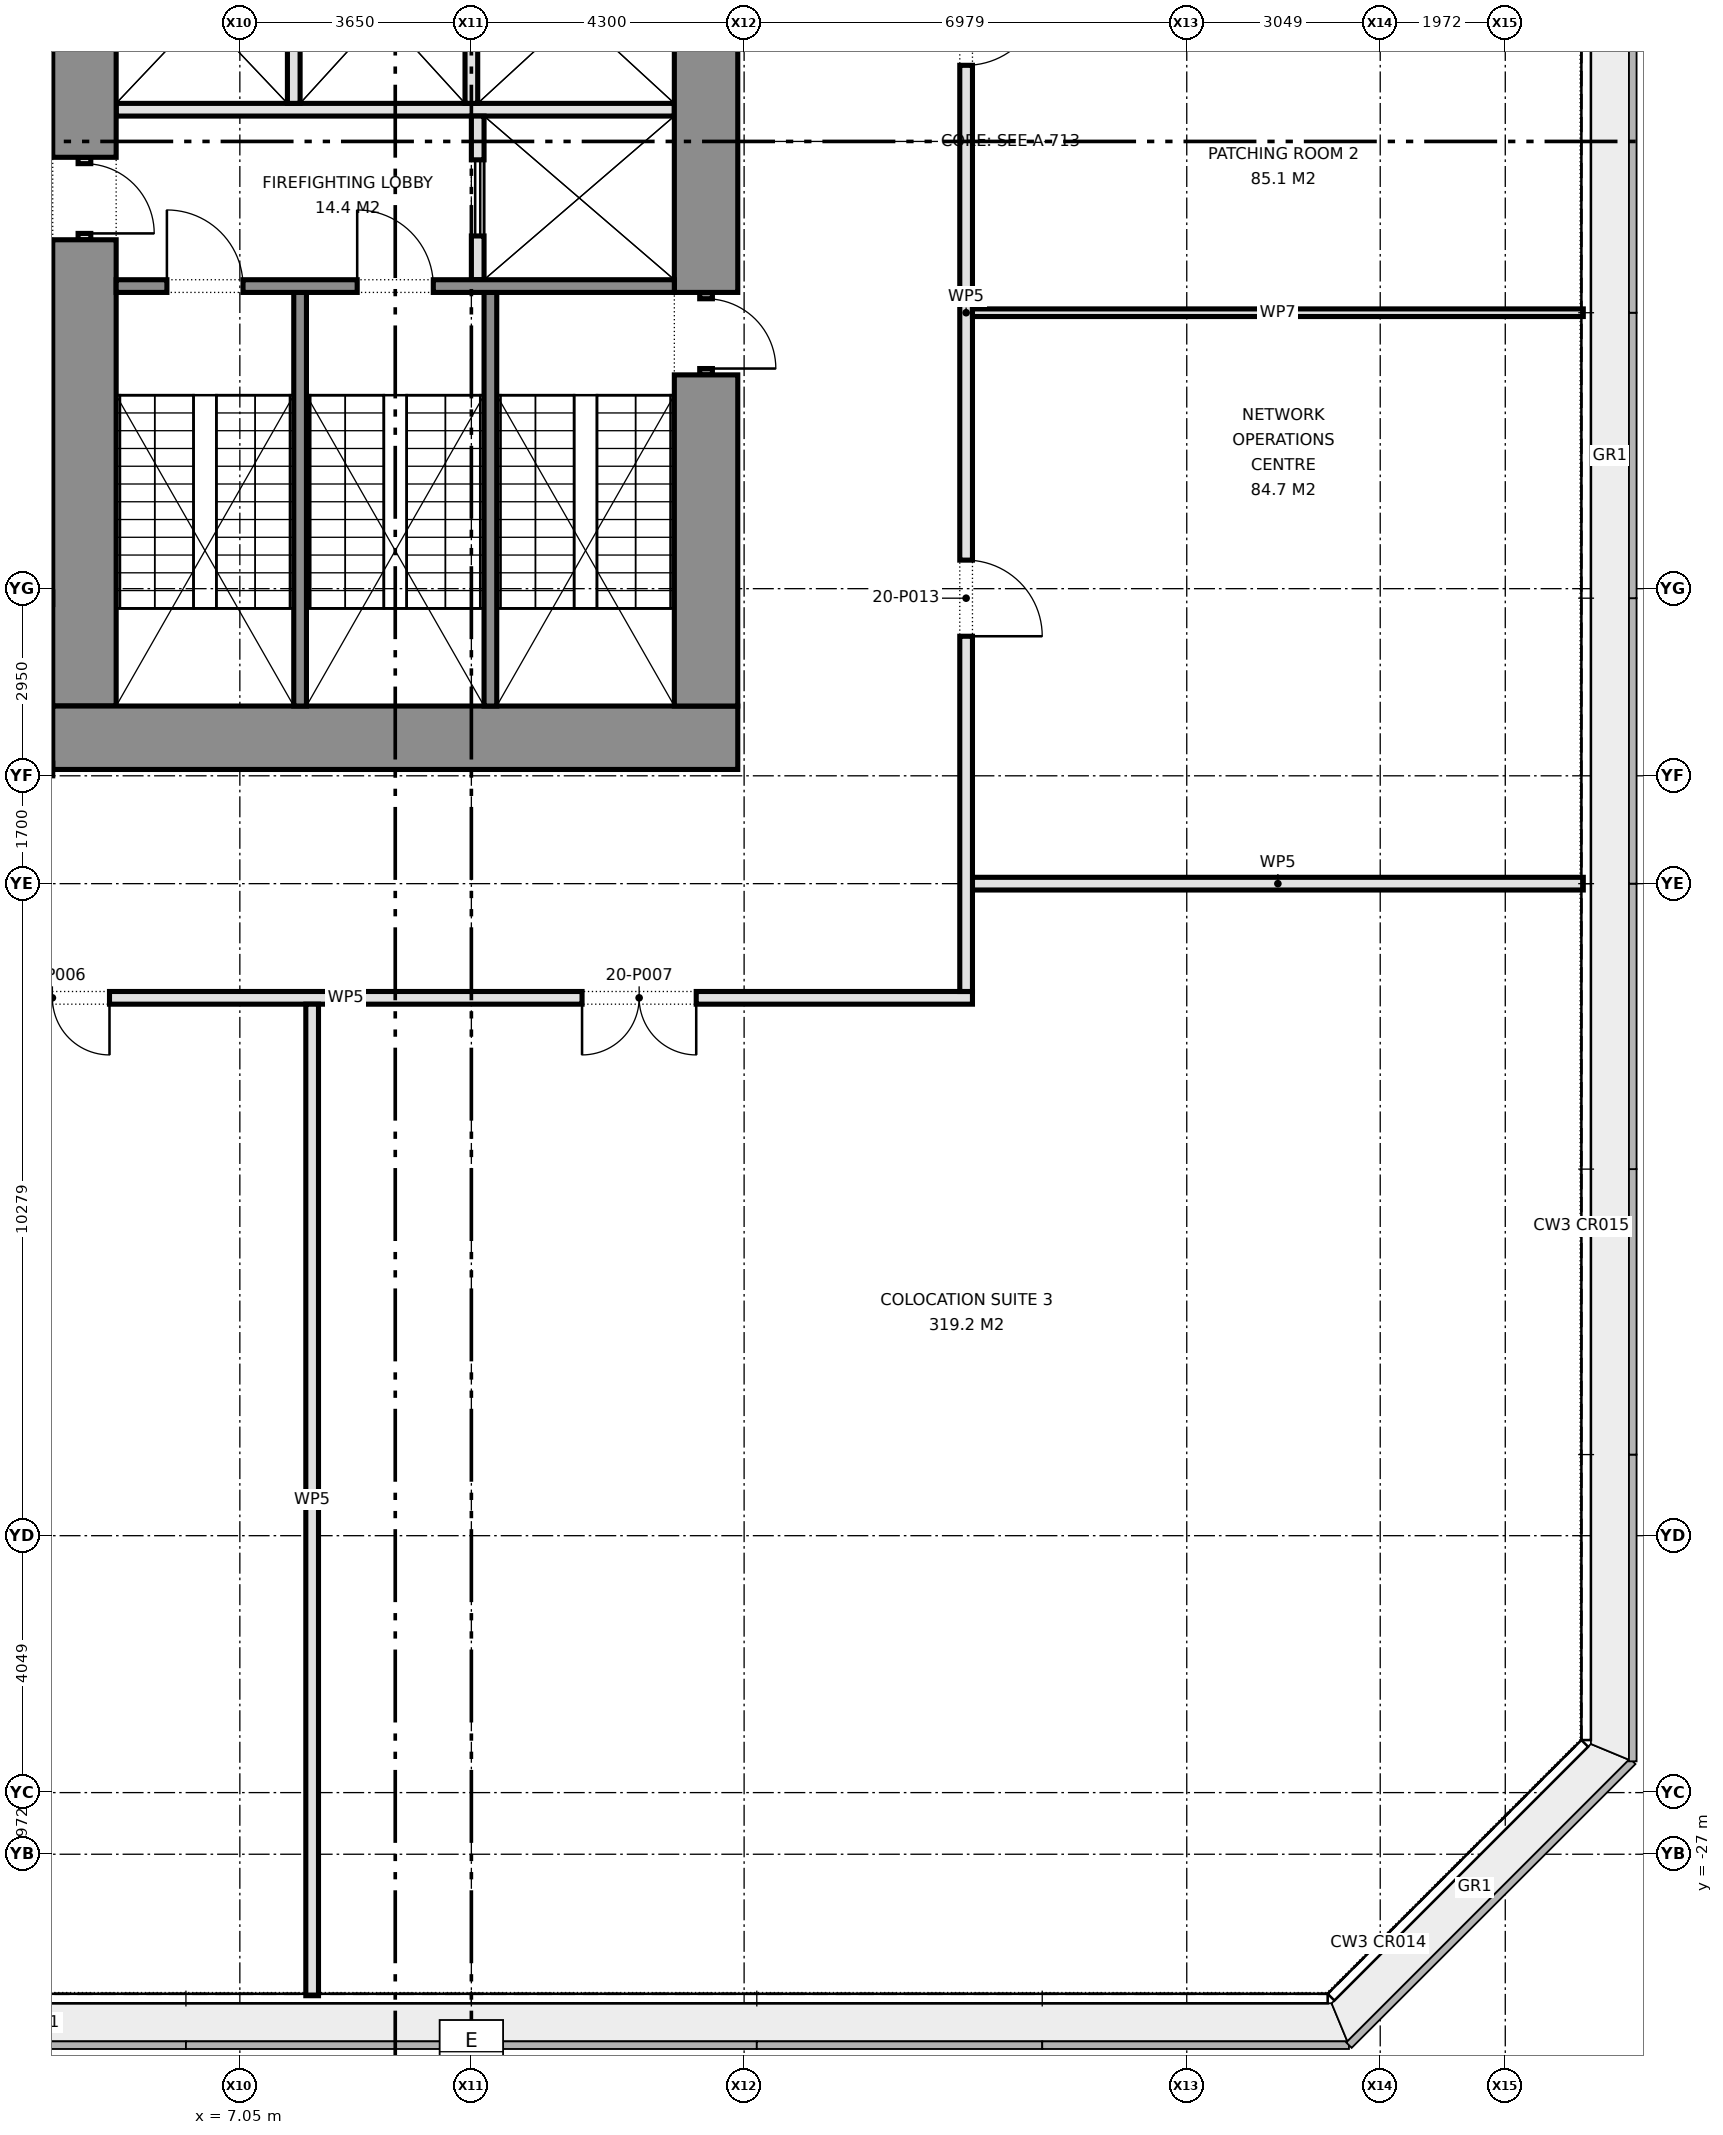
"""IFC4 building model, lengths in metres.
Left out: names, types, materials, properties, quantities, classifications, styles, units other than length and angle.
Written with IfcOpenShell. Run it as: python <this file> out.ifc"""

import sys

from ifc_helpers import new_model, si_unit, direction, frame, frame_2d, origin, place, context, subcontext, project, spatial, rectangle, extrude, element, fill, save


model = new_model("IFC4")
c1 = context("Model", 3, precision=1e-05, world=origin(), true_north=direction((0.0, 1.0)))
c2 = subcontext(c1, "Body", "Model", "MODEL_VIEW")
j1 = project(units=[si_unit("LENGTHUNIT", "METRE"), si_unit("PLANEANGLEUNIT", "RADIAN")], contexts=[c1])
p1 = place(None, origin())
s1 = spatial("IfcSite", under=j1, at=p1, CompositionType="ELEMENT")
p2 = place(p1, origin())
s2 = spatial("IfcBuilding", under=s1, at=p2, CompositionType="ELEMENT")
p3 = place(p2, frame((0.0, 0.0, 90.8)))
s3 = spatial("IfcBuildingStorey", under=s2, at=p3, CompositionType="ELEMENT", Elevation=90.8)
p4 = place(p3, frame((14.9, -9.4, 0.0), z_axis=(0.0, 0.0, 1.0), x_axis=(-1.0, 0.0, 0.0)))
e1 = element("IfcWall", 1, at=p4, inside=s3, PredefinedType="SHEAR", context=c2, shape_type="SweptSolid", body=[
    extrude(rectangle(XDim=10.8, YDim=1.0, at=frame_2d((5.4, 0.0))), origin(), (0.0, 0.0, 1.0), 4.2),
])
p5 = place(p3, frame((14.4, 3.75, 0.0), z_axis=(0.0, 0.0, 1.0), x_axis=(0.0, -1.0, 0.0)))
e2 = element("IfcWall", 2, at=p5, inside=s3, PredefinedType="SHEAR", context=c2, shape_type="SweptSolid", body=[
    extrude(rectangle(XDim=6.13, YDim=1.0, at=frame_2d((3.065, 0.0))), origin(), (0.0, 0.0, 1.0), 4.2),
])
p6 = place(p3, frame((14.4, -2.38, 0.0), z_axis=(0.0, 0.0, 1.0), x_axis=(0.0, -1.0, 0.0)))
e3 = element("IfcWall", 3, at=p6, inside=s3, PredefinedType="SHEAR", context=c2, shape_type="SweptSolid", body=[
    extrude(rectangle(XDim=1.3, YDim=0.2, at=frame_2d((0.65, 0.0))), origin(), (0.0, 0.0, 1.0), 2.4),
])
p7 = place(p6, frame((0.1, 0.0, 0.0)))
e4 = element("IfcOpeningElement", 4, at=p7, cuts=e3, PredefinedType="OPENING", context=c2, shape_type="SweptSolid", body=[
    extrude(rectangle(XDim=1.1, YDim=2.1, at=frame_2d((0.55, 1.05))), frame((0.0, 0.11, 0.0), z_axis=(0.0, -1.0, 0.0), x_axis=(1.0, 0.0, 0.0)), (0.0, 0.0, 1.0), 0.22),
])
p8 = place(p3, frame((14.4, -3.68, 0.0), z_axis=(0.0, 0.0, 1.0), x_axis=(0.0, -1.0, 0.0)))
e5 = element("IfcWall", 5, at=p8, inside=s3, PredefinedType="SHEAR", context=c2, shape_type="SweptSolid", body=[
    extrude(rectangle(XDim=5.22, YDim=1.0, at=frame_2d((2.61, 0.0))), origin(), (0.0, 0.0, 1.0), 4.2),
])
p9 = place(p3, frame((4.6, 3.75, 0.0), z_axis=(0.0, 0.0, 1.0), x_axis=(0.0, -1.0, 0.0)))
e6 = element("IfcWall", 6, at=p9, inside=s3, PredefinedType="SHEAR", context=c2, shape_type="SweptSolid", body=[
    extrude(rectangle(XDim=4.0, YDim=1.0, at=frame_2d((2.0, 0.0))), origin(), (0.0, 0.0, 1.0), 4.2),
])
p10 = place(p3, frame((4.6, -0.25, 0.0), z_axis=(0.0, 0.0, 1.0), x_axis=(0.0, -1.0, 0.0)))
e7 = element("IfcWall", 7, at=p10, inside=s3, PredefinedType="PARTITIONING", context=c2, shape_type="SweptSolid", body=[
    extrude(rectangle(XDim=1.3, YDim=0.2, at=frame_2d((0.65, 0.0))), origin(), (0.0, 0.0, 1.0), 2.4),
])
p11 = place(p10, frame((0.1, 0.0, 0.0)))
e8 = element("IfcOpeningElement", 8, at=p11, cuts=e7, PredefinedType="OPENING", context=c2, shape_type="SweptSolid", body=[
    extrude(rectangle(XDim=1.1, YDim=2.1, at=frame_2d((0.55, 1.05))), frame((0.0, 0.11, 0.0), z_axis=(0.0, -1.0, 0.0), x_axis=(1.0, 0.0, 0.0)), (0.0, 0.0, 1.0), 0.22),
])
p12 = place(p3, frame((4.6, -1.55, 0.0), z_axis=(0.0, 0.0, 1.0), x_axis=(0.0, -1.0, 0.0)))
e9 = element("IfcWall", 9, at=p12, inside=s3, PredefinedType="SHEAR", context=c2, shape_type="SweptSolid", body=[
    extrude(rectangle(XDim=7.35, YDim=1.0, at=frame_2d((3.675, 0.0))), origin(), (0.0, 0.0, 1.0), 4.2),
])
p13 = place(p3, frame((13.9, 0.5, 0.0), z_axis=(0.0, 0.0, 1.0), x_axis=(-1.0, 0.0, 0.0)))
e10 = element("IfcWall", 10, at=p13, inside=s3, PredefinedType="PARTITIONING", context=c2, shape_type="SweptSolid", body=[
    extrude(rectangle(XDim=8.8, YDim=0.2, at=frame_2d((4.4, 0.0))), origin(), (0.0, 0.0, 1.0), 4.2),
])
p14 = place(p3, frame((10.8, 0.4, 0.0), z_axis=(0.0, 0.0, 1.0), x_axis=(0.0, -1.0, 0.0)))
e11 = element("IfcWall", 11, at=p14, inside=s3, PredefinedType="PARTITIONING", context=c2, shape_type="SweptSolid", body=[
    extrude(rectangle(XDim=2.58, YDim=0.2, at=frame_2d((1.29, 0.0))), origin(), (0.0, 0.0, 1.0), 4.2),
])
p15 = place(p14, frame((0.69, 0.0, 0.0)))
e12 = element("IfcOpeningElement", 12, at=p15, cuts=e11, PredefinedType="OPENING", context=c2, shape_type="SweptSolid", body=[
    extrude(rectangle(XDim=1.2, YDim=2.1, at=frame_2d((0.6, 1.05))), frame((0.0, 0.11, 0.0), z_axis=(0.0, -1.0, 0.0), x_axis=(1.0, 0.0, 0.0)), (0.0, 0.0, 1.0), 0.22),
])
p16 = place(p3, frame((13.9, -2.28, 0.0), z_axis=(0.0, 0.0, 1.0), x_axis=(-1.0, 0.0, 0.0)))
e13 = element("IfcWall", 13, at=p16, inside=s3, PredefinedType="SHEAR", context=c2, shape_type="SweptSolid", body=[
    extrude(rectangle(XDim=8.8, YDim=0.2, at=frame_2d((4.4, 0.0))), origin(), (0.0, 0.0, 1.0), 4.2),
])
p17 = place(p16, frame((3.8, 0.0, 0.0)))
e14 = element("IfcOpeningElement", 14, at=p17, cuts=e13, PredefinedType="OPENING", context=c2, shape_type="SweptSolid", body=[
    extrude(rectangle(XDim=1.2, YDim=2.1, at=frame_2d((0.6, 1.05))), frame((0.0, 0.11, 0.0), z_axis=(0.0, -1.0, 0.0), x_axis=(1.0, 0.0, 0.0)), (0.0, 0.0, 1.0), 0.22),
])
p18 = place(p16, frame((6.8, 0.0, 0.0)))
e15 = element("IfcOpeningElement", 15, at=p18, cuts=e13, PredefinedType="OPENING", context=c2, shape_type="SweptSolid", body=[
    extrude(rectangle(XDim=1.2, YDim=2.1, at=frame_2d((0.6, 1.05))), frame((0.0, 0.11, 0.0), z_axis=(0.0, -1.0, 0.0), x_axis=(1.0, 0.0, 0.0)), (0.0, 0.0, 1.0), 0.22),
])
for number, where, z_axis, x_axis in (
    (16, (11.0, -2.38, 0.0), (0.0, 0.0, 1.0), (0.0, -1.0, 0.0)),
    (17, (8.0, -2.38, 0.0), (0.0, 0.0, 1.0), (0.0, -1.0, 0.0)),
):
    element("IfcWall", number, at=place(p3, frame(where, z_axis=z_axis, x_axis=x_axis)), inside=s3, PredefinedType="SHEAR", context=c2, shape_type="SweptSolid", body=[
        extrude(rectangle(XDim=6.52, YDim=0.2, at=frame_2d((3.26, 0.0))), origin(), (0.0, 0.0, 1.0), 4.2),
    ])
for number, where, z_axis, x_axis in (
    (18, (10.7, 3.45, 0.0), (0.0, 0.0, 1.0), (0.0, -1.0, 0.0)),
    (19, (7.9, 3.45, 0.0), (0.0, 0.0, 1.0), (0.0, -1.0, 0.0)),
):
    element("IfcWall", number, at=place(p3, frame(where, z_axis=z_axis, x_axis=x_axis)), inside=s3, PredefinedType="PARTITIONING", context=c2, shape_type="SweptSolid", body=[
        extrude(rectangle(XDim=2.85, YDim=0.2, at=frame_2d((1.425, 0.0))), origin(), (0.0, 0.0, 1.0), 4.2),
    ])
p19 = place(p3, frame((-18.6, -13.5, 0.0), z_axis=(0.0, 0.0, 1.0), x_axis=(1.0, 0.0, 0.0)))
e20 = element("IfcWall", 20, at=p19, inside=s3, PredefinedType="PARTITIONING", context=c2, shape_type="SweptSolid", body=[
    extrude(rectangle(XDim=37.2, YDim=0.2, at=frame_2d((18.6, 0.0))), origin(), (0.0, 0.0, 1.0), 4.2),
])
p20 = place(p19, frame((2.55, 0.0, 0.0)))
e21 = element("IfcOpeningElement", 21, at=p20, cuts=e20, PredefinedType="OPENING", context=c2, shape_type="SweptSolid", body=[
    extrude(rectangle(XDim=1.8, YDim=2.1, at=frame_2d((0.9, 1.05))), frame((0.0, 0.11, 0.0), z_axis=(0.0, -1.0, 0.0), x_axis=(1.0, 0.0, 0.0)), (0.0, 0.0, 1.0), 0.22),
])
p21 = place(p19, frame((21.795, 0.0, 0.0)))
e22 = element("IfcOpeningElement", 22, at=p21, cuts=e20, PredefinedType="OPENING", context=c2, shape_type="SweptSolid", body=[
    extrude(rectangle(XDim=1.8, YDim=2.1, at=frame_2d((0.9, 1.05))), frame((0.0, 0.11, 0.0), z_axis=(0.0, -1.0, 0.0), x_axis=(1.0, 0.0, 0.0)), (0.0, 0.0, 1.0), 0.22),
])
p22 = place(p19, frame((31.045, 0.0, 0.0)))
e23 = element("IfcOpeningElement", 23, at=p22, cuts=e20, PredefinedType="OPENING", context=c2, shape_type="SweptSolid", body=[
    extrude(rectangle(XDim=1.8, YDim=2.1, at=frame_2d((0.9, 1.05))), frame((0.0, 0.11, 0.0), z_axis=(0.0, -1.0, 0.0), x_axis=(1.0, 0.0, 0.0)), (0.0, 0.0, 1.0), 0.22),
])
p23 = place(p19, frame((8.0, 0.0, 0.0)))
e24 = element("IfcOpeningElement", 24, at=p23, cuts=e20, PredefinedType="OPENING", context=c2, shape_type="SweptSolid", body=[
    extrude(rectangle(XDim=1.2, YDim=2.1, at=frame_2d((0.6, 1.05))), frame((0.0, 0.11, 0.0), z_axis=(0.0, -1.0, 0.0), x_axis=(1.0, 0.0, 0.0)), (0.0, 0.0, 1.0), 0.22),
])
p24 = place(p19, frame((11.4, 0.0, 0.0)))
e25 = element("IfcOpeningElement", 25, at=p24, cuts=e20, PredefinedType="OPENING", context=c2, shape_type="SweptSolid", body=[
    extrude(rectangle(XDim=1.0, YDim=2.1, at=frame_2d((0.5, 1.05))), frame((0.0, 0.11, 0.0), z_axis=(0.0, -1.0, 0.0), x_axis=(1.0, 0.0, 0.0)), (0.0, 0.0, 1.0), 0.22),
])
p25 = place(p19, frame((14.4, 0.0, 0.0)))
e26 = element("IfcOpeningElement", 26, at=p25, cuts=e20, PredefinedType="OPENING", context=c2, shape_type="SweptSolid", body=[
    extrude(rectangle(XDim=1.0, YDim=2.1, at=frame_2d((0.5, 1.05))), frame((0.0, 0.11, 0.0), z_axis=(0.0, -1.0, 0.0), x_axis=(1.0, 0.0, 0.0)), (0.0, 0.0, 1.0), 0.22),
])
p26 = place(p19, frame((17.0, 0.0, 0.0)))
e27 = element("IfcOpeningElement", 27, at=p26, cuts=e20, PredefinedType="OPENING", context=c2, shape_type="SweptSolid", body=[
    extrude(rectangle(XDim=1.0, YDim=2.1, at=frame_2d((0.5, 1.05))), frame((0.0, 0.11, 0.0), z_axis=(0.0, -1.0, 0.0), x_axis=(1.0, 0.0, 0.0)), (0.0, 0.0, 1.0), 0.22),
])
p27 = place(p3, frame((18.6, -11.7, 0.0), z_axis=(0.0, 0.0, 1.0), x_axis=(1.0, 0.0, 0.0)))
e28 = element("IfcWall", 28, at=p27, inside=s3, PredefinedType="PARTITIONING", context=c2, shape_type="SweptSolid", body=[
    extrude(rectangle(XDim=9.63, YDim=0.2, at=frame_2d((4.815, 0.0))), origin(), (0.0, 0.0, 1.0), 4.2),
])
p28 = place(p3, frame((18.5, -13.4, 0.0), z_axis=(0.0, 0.0, 1.0), x_axis=(0.0, 1.0, 0.0)))
e29 = element("IfcWall", 29, at=p28, inside=s3, PredefinedType="PARTITIONING", context=c2, shape_type="SweptSolid", body=[
    extrude(rectangle(XDim=26.8, YDim=0.2, at=frame_2d((13.4, 0.0))), origin(), (0.0, 0.0, 1.0), 4.2),
])
p29 = place(p28, frame((5.6, 0.0, 0.0)))
e30 = element("IfcOpeningElement", 30, at=p29, cuts=e29, PredefinedType="OPENING", context=c2, shape_type="SweptSolid", body=[
    extrude(rectangle(XDim=1.2, YDim=2.1, at=frame_2d((0.6, 1.05))), frame((0.0, 0.11, 0.0), z_axis=(0.0, -1.0, 0.0), x_axis=(1.0, 0.0, 0.0)), (0.0, 0.0, 1.0), 0.22),
])
p30 = place(p28, frame((14.6, 0.0, 0.0)))
e31 = element("IfcOpeningElement", 31, at=p30, cuts=e29, PredefinedType="OPENING", context=c2, shape_type="SweptSolid", body=[
    extrude(rectangle(XDim=1.2, YDim=2.1, at=frame_2d((0.6, 1.05))), frame((0.0, 0.11, 0.0), z_axis=(0.0, -1.0, 0.0), x_axis=(1.0, 0.0, 0.0)), (0.0, 0.0, 1.0), 0.22),
])
p31 = place(p28, frame((21.05, 0.0, 0.0)))
e32 = element("IfcOpeningElement", 32, at=p31, cuts=e29, PredefinedType="OPENING", context=c2, shape_type="SweptSolid", body=[
    extrude(rectangle(XDim=1.8, YDim=2.1, at=frame_2d((0.9, 1.05))), frame((0.0, 0.11, 0.0), z_axis=(0.0, -1.0, 0.0), x_axis=(1.0, 0.0, 0.0)), (0.0, 0.0, 1.0), 0.22),
])
p32 = place(p3, frame((8.19, -29.23, 0.0), z_axis=(0.0, 0.0, 1.0), x_axis=(0.0, 1.0, 0.0)))
e33 = element("IfcWall", 33, at=p32, inside=s3, PredefinedType="PARTITIONING", context=c2, shape_type="SweptSolid", body=[
    extrude(rectangle(XDim=15.63, YDim=0.2, at=frame_2d((7.815, 0.0))), origin(), (0.0, 0.0, 1.0), 4.2),
])
p33 = place(p3, frame((18.6, -2.7, 0.0), z_axis=(0.0, 0.0, 1.0), x_axis=(1.0, 0.0, 0.0)))
e34 = element("IfcWall", 34, at=p33, inside=s3, PredefinedType="PARTITIONING", context=c2, shape_type="SweptSolid", body=[
    extrude(rectangle(XDim=9.63, YDim=0.12, at=frame_2d((4.815, 0.0))), origin(), (0.0, 0.0, 1.0), 4.2),
])
p34 = place(p7, origin())
e35 = element("IfcDoor", 35, at=p34, inside=s3, OperationType="SINGLE_SWING_RIGHT", PredefinedType="DOOR", context=c2, shape_type="SweptSolid", body=[
    extrude(rectangle(XDim=1.1, YDim=2.1, at=frame_2d((0.55, 1.05))), frame((0.0, 0.025, 0.0), z_axis=(0.0, -1.0, 0.0), x_axis=(1.0, 0.0, 0.0)), (0.0, 0.0, 1.0), 0.05),
])
fill(e4, e35)
p35 = place(p11, origin())
e36 = element("IfcDoor", 36, at=p35, inside=s3, OperationType="SINGLE_SWING_RIGHT", PredefinedType="DOOR", context=c2, shape_type="SweptSolid", body=[
    extrude(rectangle(XDim=1.1, YDim=2.1, at=frame_2d((0.55, 1.05))), frame((0.0, 0.025, 0.0), z_axis=(0.0, -1.0, 0.0), x_axis=(1.0, 0.0, 0.0)), (0.0, 0.0, 1.0), 0.05),
])
fill(e8, e36)
p36 = place(p15, origin())
e37 = element("IfcDoor", 37, at=p36, inside=s3, OperationType="DOUBLE_DOOR_SLIDING", PredefinedType="DOOR", context=c2, shape_type="SweptSolid", body=[
    extrude(rectangle(XDim=1.2, YDim=2.1, at=frame_2d((0.6, 1.05))), frame((0.0, 0.025, 0.0), z_axis=(0.0, -1.0, 0.0), x_axis=(1.0, 0.0, 0.0)), (0.0, 0.0, 1.0), 0.05),
])
fill(e12, e37)
p37 = place(p17, frame((1.2, 0.0, 0.0), z_axis=(0.0, 0.0, 1.0), x_axis=(-1.0, 0.0, 0.0)))
e38 = element("IfcDoor", 38, at=p37, inside=s3, OperationType="SINGLE_SWING_LEFT", PredefinedType="DOOR", context=c2, shape_type="SweptSolid", body=[
    extrude(rectangle(XDim=1.2, YDim=2.1, at=frame_2d((0.6, 1.05))), frame((0.0, 0.025, 0.0), z_axis=(0.0, -1.0, 0.0), x_axis=(1.0, 0.0, 0.0)), (0.0, 0.0, 1.0), 0.05),
])
fill(e14, e38)
p38 = place(p18, frame((1.2, 0.0, 0.0), z_axis=(0.0, 0.0, 1.0), x_axis=(-1.0, 0.0, 0.0)))
e39 = element("IfcDoor", 39, at=p38, inside=s3, OperationType="SINGLE_SWING_LEFT", PredefinedType="DOOR", context=c2, shape_type="SweptSolid", body=[
    extrude(rectangle(XDim=1.2, YDim=2.1, at=frame_2d((0.6, 1.05))), frame((0.0, 0.025, 0.0), z_axis=(0.0, -1.0, 0.0), x_axis=(1.0, 0.0, 0.0)), (0.0, 0.0, 1.0), 0.05),
])
fill(e15, e39)
p39 = place(p21, frame((1.8, 0.0, 0.0), z_axis=(0.0, 0.0, 1.0), x_axis=(-1.0, 0.0, 0.0)))
e40 = element("IfcDoor", 40, at=p39, inside=s3, OperationType="DOUBLE_DOOR_SINGLE_SWING", PredefinedType="DOOR", context=c2, shape_type="SweptSolid", body=[
    extrude(rectangle(XDim=1.8, YDim=2.1, at=frame_2d((0.9, 1.05))), frame((0.0, 0.025, 0.0), z_axis=(0.0, -1.0, 0.0), x_axis=(1.0, 0.0, 0.0)), (0.0, 0.0, 1.0), 0.05),
])
fill(e22, e40)
p40 = place(p22, frame((1.8, 0.0, 0.0), z_axis=(0.0, 0.0, 1.0), x_axis=(-1.0, 0.0, 0.0)))
e41 = element("IfcDoor", 41, at=p40, inside=s3, OperationType="DOUBLE_DOOR_SINGLE_SWING", PredefinedType="DOOR", context=c2, shape_type="SweptSolid", body=[
    extrude(rectangle(XDim=1.8, YDim=2.1, at=frame_2d((0.9, 1.05))), frame((0.0, 0.025, 0.0), z_axis=(0.0, -1.0, 0.0), x_axis=(1.0, 0.0, 0.0)), (0.0, 0.0, 1.0), 0.05),
])
fill(e23, e41)
p41 = place(p29, frame((1.2, 0.0, 0.0), z_axis=(0.0, 0.0, 1.0), x_axis=(-1.0, 0.0, 0.0)))
e42 = element("IfcDoor", 42, at=p41, inside=s3, OperationType="SINGLE_SWING_RIGHT", PredefinedType="DOOR", context=c2, shape_type="SweptSolid", body=[
    extrude(rectangle(XDim=1.2, YDim=2.1, at=frame_2d((0.6, 1.05))), frame((0.0, 0.025, 0.0), z_axis=(0.0, -1.0, 0.0), x_axis=(1.0, 0.0, 0.0)), (0.0, 0.0, 1.0), 0.05),
])
fill(e30, e42)
p42 = place(p30, frame((1.2, 0.0, 0.0), z_axis=(0.0, 0.0, 1.0), x_axis=(-1.0, 0.0, 0.0)))
e43 = element("IfcDoor", 43, at=p42, inside=s3, OperationType="SINGLE_SWING_LEFT", PredefinedType="DOOR", context=c2, shape_type="SweptSolid", body=[
    extrude(rectangle(XDim=1.2, YDim=2.1, at=frame_2d((0.6, 1.05))), frame((0.0, 0.025, 0.0), z_axis=(0.0, -1.0, 0.0), x_axis=(1.0, 0.0, 0.0)), (0.0, 0.0, 1.0), 0.05),
])
fill(e31, e43)
save(model, sys.argv[1])
